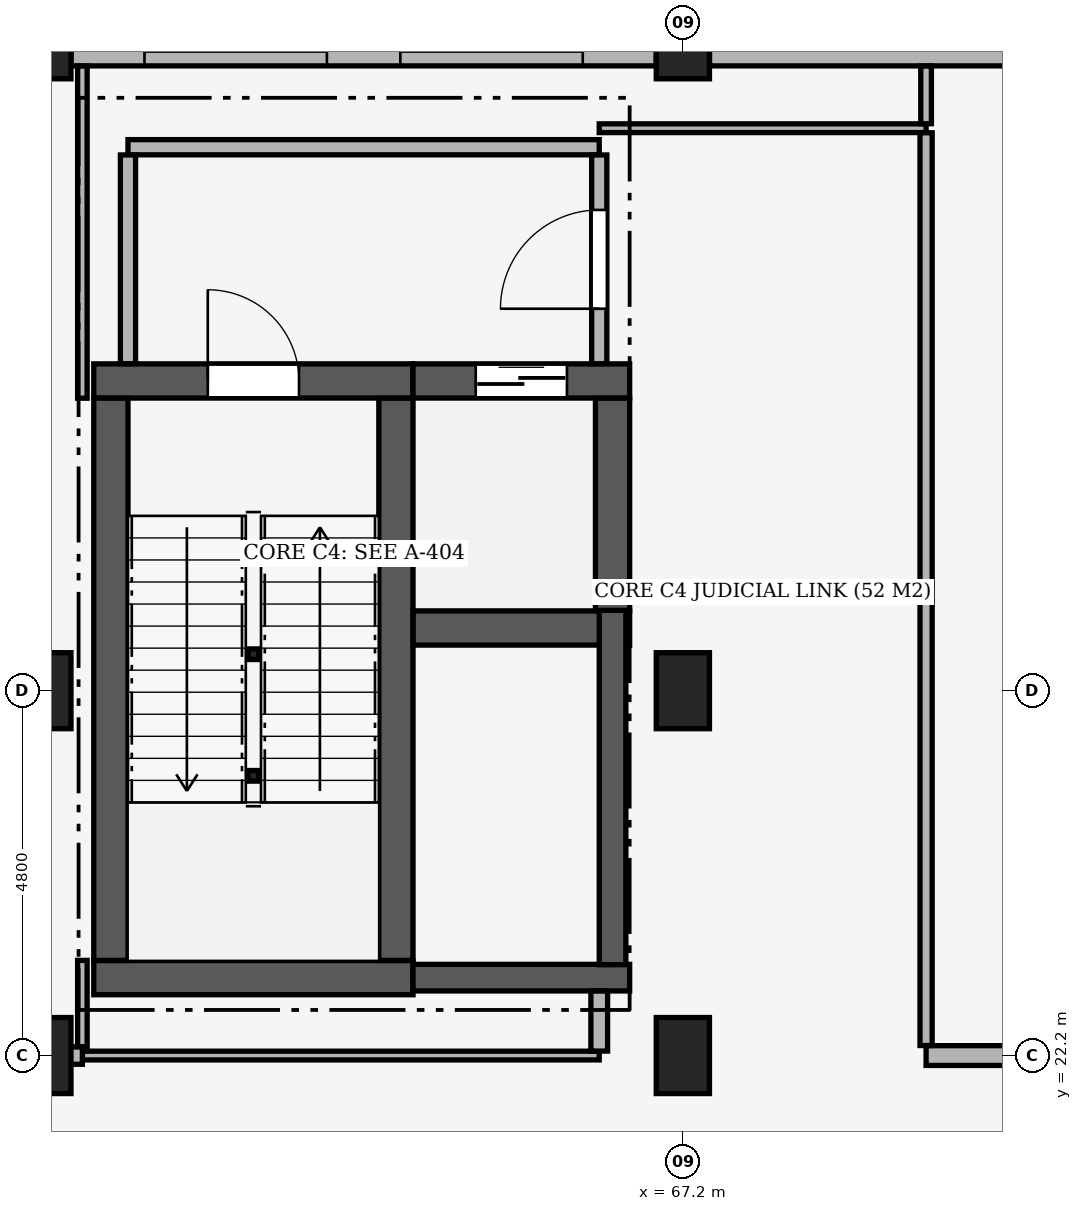
"""IFC4 building model, lengths in metres.
Left out: names, types, materials, properties, quantities, classifications, styles, units other than length and angle.
Written with IfcOpenShell. Run it as: python <this file> out.ifc"""

import sys

from ifc_helpers import new_model, si_unit, direction, frame, frame_2d, origin, origin_2d, place, context, subcontext, project, spatial, rectangle, hollow_circle, extrude, element, fill, save


model = new_model("IFC4")
c1 = context("Model", 3, precision=1e-05, world=origin(), true_north=direction((0.0, 1.0)))
c2 = subcontext(c1, "Body", "Model", "MODEL_VIEW")
j1 = project(units=[si_unit("LENGTHUNIT", "METRE"), si_unit("PLANEANGLEUNIT", "RADIAN")], contexts=[c1])
p1 = place(None, origin())
s1 = spatial("IfcSite", under=j1, at=p1, CompositionType="ELEMENT")
p2 = place(p1, origin())
s2 = spatial("IfcBuilding", under=s1, at=p2, CompositionType="ELEMENT")
p3 = place(p2, origin())
s3 = spatial("IfcBuildingStorey", under=s2, at=p3, CompositionType="ELEMENT", Elevation=0.0)
for number, where, z_axis, x_axis in (
    (1, (58.8, 22.2, 0.0), (0.0, 0.0, 1.0), (1.0, 0.0, 0.0)),
    (2, (58.8, 27.0, 0.0), (0.0, 0.0, 1.0), (1.0, 0.0, 0.0)),
):
    element("IfcColumn", number, at=place(p3, frame(where, z_axis=z_axis, x_axis=x_axis)), inside=s3, PredefinedType="COLUMN", context=c2, shape_type="SweptSolid", body=[
        extrude(rectangle(XDim=0.7, YDim=1.0, at=origin_2d()), origin(), (0.0, 0.0, 1.0), 5.1),
    ])
p4 = place(p3, frame((58.8, 35.4, 0.0), z_axis=(0.0, 0.0, 1.0), x_axis=(1.0, 0.0, 0.0)))
e3 = element("IfcColumn", 3, at=p4, inside=s3, PredefinedType="COLUMN", context=c2, shape_type="SweptSolid", body=[
    extrude(rectangle(XDim=0.7, YDim=0.7, at=origin_2d()), origin(), (0.0, 0.0, 1.0), 5.1),
])
for number, where, z_axis, x_axis in (
    (4, (67.2, 22.2, 0.0), (0.0, 0.0, 1.0), (1.0, 0.0, 0.0)),
    (5, (67.2, 27.0, 0.0), (0.0, 0.0, 1.0), (1.0, 0.0, 0.0)),
):
    element("IfcColumn", number, at=place(p3, frame(where, z_axis=z_axis, x_axis=x_axis)), inside=s3, PredefinedType="COLUMN", context=c2, shape_type="SweptSolid", body=[
        extrude(rectangle(XDim=0.7, YDim=1.0, at=origin_2d()), origin(), (0.0, 0.0, 1.0), 5.1),
    ])
p5 = place(p3, frame((67.2, 35.4, 0.0), z_axis=(0.0, 0.0, 1.0), x_axis=(1.0, 0.0, 0.0)))
e6 = element("IfcColumn", 6, at=p5, inside=s3, PredefinedType="COLUMN", context=c2, shape_type="SweptSolid", body=[
    extrude(rectangle(XDim=0.7, YDim=0.7, at=origin_2d()), origin(), (0.0, 0.0, 1.0), 5.1),
])
for number, where, z_axis, x_axis in (
    (7, (61.55, 25.88, 0.0), (0.0, 0.0, 1.0), (1.0, 0.0, 0.0)),
    (8, (61.55, 27.48, 0.0), (0.0, 0.0, 1.0), (1.0, 0.0, 0.0)),
):
    element("IfcColumn", number, at=place(p3, frame(where, z_axis=z_axis, x_axis=x_axis)), inside=s3, PredefinedType="COLUMN", context=c2, shape_type="SweptSolid", body=[
        extrude(hollow_circle(Radius=0.07, WallThickness=0.008, at=origin_2d()), origin(), (0.0, 0.0, 1.0), 2.12),
    ])
p6 = place(p3, frame((59.15, 35.4, 0.0), z_axis=(0.0, 0.0, 1.0), x_axis=(1.0, 0.0, 0.0)))
e9 = element("IfcWall", 9, at=p6, inside=s3, PredefinedType="SOLIDWALL", context=c2, shape_type="SweptSolid", body=[
    extrude(rectangle(XDim=7.7, YDim=0.36, at=frame_2d((3.85, 0.0))), origin(), (0.0, 0.0, 1.0), 4.07),
])
p7 = place(p6, frame((0.967, 0.0, 0.85)))
e10 = element("IfcOpeningElement", 10, at=p7, cuts=e9, PredefinedType="OPENING", context=c2, shape_type="SweptSolid", body=[
    extrude(rectangle(XDim=2.4, YDim=2.4, at=frame_2d((1.2, 1.2))), frame((0.0, 0.195, 0.0), z_axis=(0.0, -1.0, 0.0), x_axis=(1.0, 0.0, 0.0)), (0.0, 0.0, 1.0), 0.39),
])
p8 = place(p6, frame((4.333, 0.0, 0.85)))
e11 = element("IfcOpeningElement", 11, at=p8, cuts=e9, PredefinedType="OPENING", context=c2, shape_type="SweptSolid", body=[
    extrude(rectangle(XDim=2.4, YDim=2.4, at=frame_2d((1.2, 1.2))), frame((0.0, 0.195, 0.0), z_axis=(0.0, -1.0, 0.0), x_axis=(1.0, 0.0, 0.0)), (0.0, 0.0, 1.0), 0.39),
])
p9 = place(p3, frame((67.55, 35.4, 0.0), z_axis=(0.0, 0.0, 1.0), x_axis=(1.0, 0.0, 0.0)))
e12 = element("IfcWall", 12, at=p9, inside=s3, PredefinedType="SOLIDWALL", context=c2, shape_type="SweptSolid", body=[
    extrude(rectangle(XDim=7.7, YDim=0.36, at=frame_2d((3.85, 0.0))), origin(), (0.0, 0.0, 1.0), 4.07),
])
p10 = place(p9, frame((4.333, 0.0, 0.85)))
e13 = element("IfcOpeningElement", 13, at=p10, cuts=e12, PredefinedType="OPENING", context=c2, shape_type="SweptSolid", body=[
    extrude(rectangle(XDim=2.4, YDim=2.4, at=frame_2d((1.2, 1.2))), frame((0.0, 0.195, 0.0), z_axis=(0.0, -1.0, 0.0), x_axis=(1.0, 0.0, 0.0)), (0.0, 0.0, 1.0), 0.39),
])
p11 = place(p3, frame((59.45, 31.075, 0.0), z_axis=(0.0, 0.0, 1.0), x_axis=(1.0, 0.0, 0.0)))
e14 = element("IfcWall", 14, at=p11, inside=s3, PredefinedType="SHEAR", context=c2, shape_type="SweptSolid", body=[
    extrude(rectangle(XDim=4.2, YDim=0.45, at=frame_2d((2.1, 0.0))), origin(), (0.0, 0.0, 1.0), 4.82),
])
p12 = place(p11, frame((1.5, 0.0, 0.0)))
e15 = element("IfcOpeningElement", 15, at=p12, cuts=e14, PredefinedType="OPENING", context=c2, shape_type="SweptSolid", body=[
    extrude(rectangle(XDim=1.2, YDim=2.2, at=frame_2d((0.6, 1.1))), frame((0.0, 0.24, 0.0), z_axis=(0.0, -1.0, 0.0), x_axis=(1.0, 0.0, 0.0)), (0.0, 0.0, 1.0), 0.48),
])
p13 = place(p3, frame((59.45, 23.225, 0.0), z_axis=(0.0, 0.0, 1.0), x_axis=(1.0, 0.0, 0.0)))
e16 = element("IfcWall", 16, at=p13, inside=s3, PredefinedType="SHEAR", context=c2, shape_type="SweptSolid", body=[
    extrude(rectangle(XDim=4.2, YDim=0.45, at=frame_2d((2.1, 0.0))), origin(), (0.0, 0.0, 1.0), 4.82),
])
for number, where, z_axis, x_axis in (
    (17, (59.675, 23.452, 0.0), (0.0, 0.0, 1.0), (0.0, 1.0, 0.0)),
    (18, (63.425, 23.452, 0.0), (0.0, 0.0, 1.0), (0.0, 1.0, 0.0)),
):
    element("IfcWall", number, at=place(p3, frame(where, z_axis=z_axis, x_axis=x_axis)), inside=s3, PredefinedType="SHEAR", context=c2, shape_type="SweptSolid", body=[
        extrude(rectangle(XDim=7.396, YDim=0.45, at=frame_2d((3.698, 0.0))), origin(), (0.0, 0.0, 1.0), 4.82),
    ])
p14 = place(p3, frame((63.652, 27.825, 0.0), z_axis=(0.0, 0.0, 1.0), x_axis=(1.0, 0.0, 0.0)))
e19 = element("IfcWall", 19, at=p14, inside=s3, PredefinedType="SHEAR", context=c2, shape_type="SweptSolid", body=[
    extrude(rectangle(XDim=2.848, YDim=0.45, at=frame_2d((1.424, 0.0))), origin(), (0.0, 0.0, 1.0), 4.82),
])
p15 = place(p3, frame((63.65, 31.075, 0.0), z_axis=(0.0, 0.0, 1.0), x_axis=(1.0, 0.0, 0.0)))
e20 = element("IfcWall", 20, at=p15, inside=s3, PredefinedType="SHEAR", context=c2, shape_type="SweptSolid", body=[
    extrude(rectangle(XDim=2.85, YDim=0.45, at=frame_2d((1.425, 0.0))), origin(), (0.0, 0.0, 1.0), 4.82),
])
p16 = place(p15, frame((0.825, 0.0, 0.0)))
e21 = element("IfcOpeningElement", 21, at=p16, cuts=e20, PredefinedType="OPENING", context=c2, shape_type="SweptSolid", body=[
    extrude(rectangle(XDim=1.2, YDim=2.15, at=frame_2d((0.6, 1.075))), frame((0.0, 0.24, 0.0), z_axis=(0.0, -1.0, 0.0), x_axis=(1.0, 0.0, 0.0)), (0.0, 0.0, 1.0), 0.48),
])
p17 = place(p3, frame((66.275, 28.052, 0.0), z_axis=(0.0, 0.0, 1.0), x_axis=(0.0, 1.0, 0.0)))
e22 = element("IfcWall", 22, at=p17, inside=s3, PredefinedType="SHEAR", context=c2, shape_type="SweptSolid", body=[
    extrude(rectangle(XDim=2.796, YDim=0.45, at=frame_2d((1.398, 0.0))), origin(), (0.0, 0.0, 1.0), 4.82),
])
p18 = place(p3, frame((63.65, 23.225, 0.0), z_axis=(0.0, 0.0, 1.0), x_axis=(1.0, 0.0, 0.0)))
e23 = element("IfcWall", 23, at=p18, inside=s3, PredefinedType="SHEAR", context=c2, shape_type="SweptSolid", body=[
    extrude(rectangle(XDim=2.85, YDim=0.35, at=frame_2d((1.425, 0.0))), origin(), (0.0, 0.0, 1.0), 4.82),
])
p19 = place(p3, frame((66.275, 23.395, 0.0), z_axis=(0.0, 0.0, 1.0), x_axis=(0.0, 1.0, 0.0)))
e24 = element("IfcWall", 24, at=p19, inside=s3, PredefinedType="SHEAR", context=c2, shape_type="SweptSolid", body=[
    extrude(rectangle(XDim=4.662, YDim=0.35, at=frame_2d((2.331, 0.0))), origin(), (0.0, 0.0, 1.0), 4.82),
])
p20 = place(p3, frame((59.3, 22.2, 0.0), z_axis=(0.0, 0.0, 1.0), x_axis=(1.0, 0.0, 0.0)))
e25 = element("IfcWall", 25, at=p20, inside=s3, PredefinedType="PARTITIONING", context=c2, shape_type="SweptSolid", body=[
    extrude(rectangle(XDim=6.8, YDim=0.115, at=frame_2d((3.4, 0.0))), origin(), (0.0, 0.0, 1.0), 4.07),
])
p21 = place(p3, frame((38.6, 22.2, 0.0), z_axis=(0.0, 0.0, 1.0), x_axis=(1.0, 0.0, 0.0)))
e26 = element("IfcWall", 26, at=p21, inside=s3, PredefinedType="SOLIDWALL", context=c2, shape_type="SweptSolid", body=[
    extrude(rectangle(XDim=20.7, YDim=0.23, at=frame_2d((10.35, 0.0))), origin(), (0.0, 0.0, 1.0), 4.07),
])
p22 = place(p21, frame((9.425, 0.0, 0.0)))
e27 = element("IfcOpeningElement", 27, at=p22, cuts=e26, PredefinedType="OPENING", context=c2, shape_type="SweptSolid", body=[
    extrude(rectangle(XDim=0.95, YDim=2.1, at=frame_2d((0.475, 1.05))), frame((0.0, 0.13, 0.0), z_axis=(0.0, -1.0, 0.0), x_axis=(1.0, 0.0, 0.0)), (0.0, 0.0, 1.0), 0.26),
])
p23 = place(p3, frame((70.4, 22.2, 0.0), z_axis=(0.0, 0.0, 1.0), x_axis=(1.0, 0.0, 0.0)))
e28 = element("IfcWall", 28, at=p23, inside=s3, PredefinedType="PARTITIONING", context=c2, shape_type="SweptSolid", body=[
    extrude(rectangle(XDim=17.6, YDim=0.26, at=frame_2d((8.8, 0.0))), origin(), (0.0, 0.0, 1.0), 4.07),
])
p24 = place(p23, frame((8.275, 0.0, 0.0)))
e29 = element("IfcOpeningElement", 29, at=p24, cuts=e28, PredefinedType="OPENING", context=c2, shape_type="SweptSolid", body=[
    extrude(rectangle(XDim=1.05, YDim=2.1, at=frame_2d((0.525, 1.05))), frame((0.0, 0.145, 0.0), z_axis=(0.0, -1.0, 0.0), x_axis=(1.0, 0.0, 0.0)), (0.0, 0.0, 1.0), 0.29),
])
p25 = place(p3, frame((59.9, 34.15, 0.0), z_axis=(0.0, 0.0, 1.0), x_axis=(1.0, 0.0, 0.0)))
e30 = element("IfcWall", 30, at=p25, inside=s3, PredefinedType="PARTITIONING", context=c2, shape_type="SweptSolid", body=[
    extrude(rectangle(XDim=6.2, YDim=0.2, at=frame_2d((3.1, 0.0))), origin(), (0.0, 0.0, 1.0), 4.82),
])
p26 = place(p3, frame((66.1, 34.4, 0.0), z_axis=(0.0, 0.0, 1.0), x_axis=(1.0, 0.0, 0.0)))
e31 = element("IfcWall", 31, at=p26, inside=s3, PredefinedType="PARTITIONING", context=c2, shape_type="SweptSolid", body=[
    extrude(rectangle(XDim=4.3, YDim=0.115, at=frame_2d((2.15, 0.0))), origin(), (0.0, 0.0, 1.0), 4.02),
])
p27 = place(p3, frame((59.3, 22.317, 0.0), z_axis=(0.0, 0.0, 1.0), x_axis=(0.0, 1.0, 0.0)))
e32 = element("IfcWall", 32, at=p27, inside=s3, PredefinedType="PARTITIONING", context=c2, shape_type="SweptSolid", body=[
    extrude(rectangle(XDim=1.135, YDim=0.125, at=frame_2d((0.567, 0.0))), origin(), (0.0, 0.0, 1.0), 4.07),
])
p28 = place(p3, frame((59.3, 30.848, 0.0), z_axis=(0.0, 0.0, 1.0), x_axis=(0.0, 1.0, 0.0)))
e33 = element("IfcWall", 33, at=p28, inside=s3, PredefinedType="PARTITIONING", context=c2, shape_type="SweptSolid", body=[
    extrude(rectangle(XDim=4.37, YDim=0.125, at=frame_2d((2.185, 0.0))), origin(), (0.0, 0.0, 1.0), 4.07),
])
p29 = place(p3, frame((59.9, 31.302, 0.0), z_axis=(0.0, 0.0, 1.0), x_axis=(0.0, 1.0, 0.0)))
e34 = element("IfcWall", 34, at=p29, inside=s3, PredefinedType="PARTITIONING", context=c2, shape_type="SweptSolid", body=[
    extrude(rectangle(XDim=2.746, YDim=0.2, at=frame_2d((1.373, 0.0))), origin(), (0.0, 0.0, 1.0), 4.37),
])
p30 = place(p3, frame((66.1, 31.302, 0.0), z_axis=(0.0, 0.0, 1.0), x_axis=(0.0, 1.0, 0.0)))
e35 = element("IfcWall", 35, at=p30, inside=s3, PredefinedType="PARTITIONING", context=c2, shape_type="SweptSolid", body=[
    extrude(rectangle(XDim=2.746, YDim=0.2, at=frame_2d((1.373, 0.0))), origin(), (0.0, 0.0, 1.0), 4.37),
])
p31 = place(p30, frame((0.723, 0.0, 0.0)))
e36 = element("IfcOpeningElement", 36, at=p31, cuts=e35, PredefinedType="OPENING", context=c2, shape_type="SweptSolid", body=[
    extrude(rectangle(XDim=1.3, YDim=2.2, at=frame_2d((0.65, 1.1))), frame((0.0, 0.115, 0.0), z_axis=(0.0, -1.0, 0.0), x_axis=(1.0, 0.0, 0.0)), (0.0, 0.0, 1.0), 0.23),
])
p32 = place(p3, frame((66.1, 22.259, 0.0), z_axis=(0.0, 0.0, 1.0), x_axis=(0.0, 1.0, 0.0)))
e37 = element("IfcWall", 37, at=p32, inside=s3, PredefinedType="PARTITIONING", context=c2, shape_type="SweptSolid", body=[
    extrude(rectangle(XDim=0.789, YDim=0.22, at=frame_2d((0.395, 0.0))), origin(), (0.0, 0.0, 1.0), 4.07),
])
p33 = place(p3, frame((70.4, 22.332, 0.0), z_axis=(0.0, 0.0, 1.0), x_axis=(0.0, 1.0, 0.0)))
e38 = element("IfcWall", 38, at=p33, inside=s3, PredefinedType="PARTITIONING", context=c2, shape_type="SweptSolid", body=[
    extrude(rectangle(XDim=12.008, YDim=0.16, at=frame_2d((6.004, 0.0))), origin(), (0.0, 0.0, 1.0), 4.07),
])
p34 = place(p3, frame((70.4, 34.459, 0.0), z_axis=(0.0, 0.0, 1.0), x_axis=(0.0, 1.0, 0.0)))
e39 = element("IfcWall", 39, at=p34, inside=s3, PredefinedType="PARTITIONING", context=c2, shape_type="SweptSolid", body=[
    extrude(rectangle(XDim=0.759, YDim=0.14, at=frame_2d((0.379, 0.0))), origin(), (0.0, 0.0, 1.0), 4.07),
])
p35 = place(p7, origin())
e40 = element("IfcWindow", 40, at=p35, inside=s3, PartitioningType="SINGLE_PANEL", PredefinedType="WINDOW", context=c2, shape_type="SweptSolid", body=[
    extrude(rectangle(XDim=2.4, YDim=2.4, at=frame_2d((1.2, 1.2))), frame((0.0, 0.03, 0.0), z_axis=(0.0, -1.0, 0.0), x_axis=(1.0, 0.0, 0.0)), (0.0, 0.0, 1.0), 0.06),
])
fill(e10, e40)
p36 = place(p8, origin())
e41 = element("IfcWindow", 41, at=p36, inside=s3, PartitioningType="SINGLE_PANEL", PredefinedType="WINDOW", context=c2, shape_type="SweptSolid", body=[
    extrude(rectangle(XDim=2.4, YDim=2.4, at=frame_2d((1.2, 1.2))), frame((0.0, 0.03, 0.0), z_axis=(0.0, -1.0, 0.0), x_axis=(1.0, 0.0, 0.0)), (0.0, 0.0, 1.0), 0.06),
])
fill(e11, e41)
p37 = place(p12, origin())
e42 = element("IfcDoor", 42, at=p37, inside=s3, OperationType="SINGLE_SWING_LEFT", PredefinedType="DOOR", context=c2, shape_type="SweptSolid", body=[
    extrude(rectangle(XDim=1.2, YDim=2.2, at=frame_2d((0.6, 1.1))), frame((0.0, 0.025, 0.0), z_axis=(0.0, -1.0, 0.0), x_axis=(1.0, 0.0, 0.0)), (0.0, 0.0, 1.0), 0.05),
])
fill(e15, e42)
p38 = place(p16, origin())
e43 = element("IfcDoor", 43, at=p38, inside=s3, OperationType="DOUBLE_DOOR_SLIDING", PredefinedType="DOOR", context=c2, shape_type="SweptSolid", body=[
    extrude(rectangle(XDim=1.2, YDim=2.15, at=frame_2d((0.6, 1.075))), frame((0.0, 0.025, 0.0), z_axis=(0.0, -1.0, 0.0), x_axis=(1.0, 0.0, 0.0)), (0.0, 0.0, 1.0), 0.05),
])
fill(e21, e43)
p39 = place(p31, origin())
e44 = element("IfcDoor", 44, at=p39, inside=s3, OperationType="SINGLE_SWING_LEFT", PredefinedType="DOOR", context=c2, shape_type="SweptSolid", body=[
    extrude(rectangle(XDim=1.3, YDim=2.2, at=frame_2d((0.65, 1.1))), frame((0.0, 0.025, 0.0), z_axis=(0.0, -1.0, 0.0), x_axis=(1.0, 0.0, 0.0)), (0.0, 0.0, 1.0), 0.05),
])
fill(e36, e44)
save(model, sys.argv[1])
